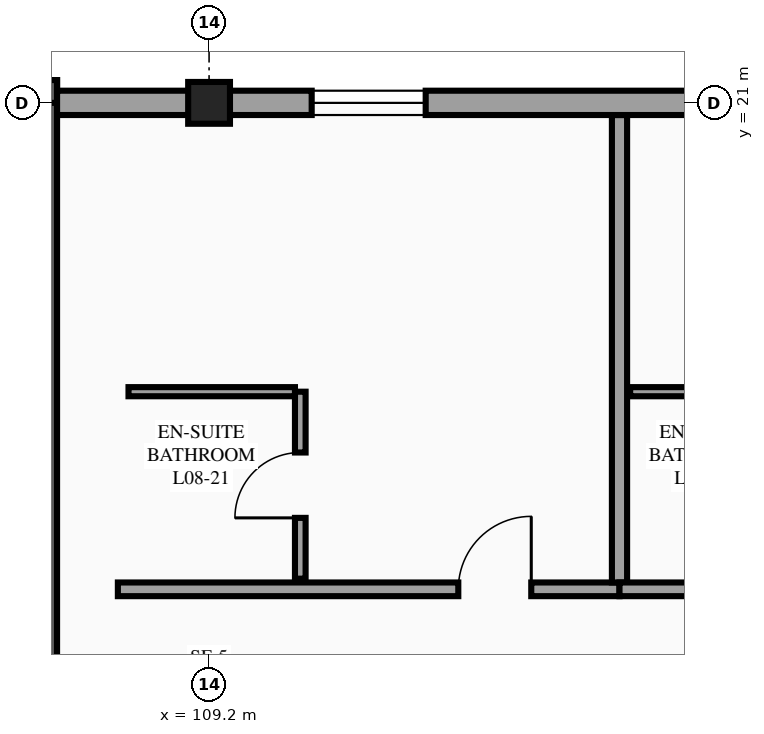
"""IFC4 building model, lengths in metres.
Left out: names, types, materials, properties, quantities, classifications, styles, units other than length and angle.
Written with IfcOpenShell. Run it as: python <this file> out.ifc"""

import sys

from ifc_helpers import new_model, si_unit, direction, frame, frame_2d, origin, origin_2d, place, context, subcontext, project, spatial, rectangle, extrude, element, fill, save


model = new_model("IFC4")
c1 = context("Model", 3, precision=1e-05, world=origin(), true_north=direction((0.0, 1.0)))
c2 = subcontext(c1, "Body", "Model", "MODEL_VIEW")
j1 = project(units=[si_unit("LENGTHUNIT", "METRE"), si_unit("PLANEANGLEUNIT", "RADIAN")], contexts=[c1])
p1 = place(None, origin())
s1 = spatial("IfcSite", under=j1, at=p1, CompositionType="ELEMENT")
p2 = place(p1, origin())
s2 = spatial("IfcBuilding", under=s1, at=p2, CompositionType="ELEMENT")
p3 = place(p2, frame((0.0, 0.0, 32.7)))
s3 = spatial("IfcBuildingStorey", under=s2, at=p3, CompositionType="ELEMENT", Elevation=32.7)
p4 = place(p3, frame((109.2, 21.0, 0.0), z_axis=(0.0, 0.0, 1.0), x_axis=(1.0, 0.0, 0.0)))
e1 = element("IfcColumn", 1, at=p4, inside=s3, PredefinedType="COLUMN", context=c2, shape_type="SweptSolid", body=[
    extrude(rectangle(XDim=0.55, YDim=0.55, at=origin_2d()), origin(), (0.0, 0.0, 1.0), 3.6),
])
p5 = place(p3, frame((107.05, 12.46, 0.0), z_axis=(0.0, 0.0, 1.0), x_axis=(0.0, 1.0, 0.0)))
e2 = element("IfcWall", 2, at=p5, inside=s3, PredefinedType="SHEAR", context=c2, shape_type="SweptSolid", body=[
    extrude(rectangle(XDim=8.84, YDim=0.3, at=frame_2d((4.42, 0.0))), origin(), (0.0, 0.0, 1.0), 3.6),
])
p6 = place(p3, frame((107.2, 21.15, 0.0), z_axis=(0.0, 0.0, 1.0), x_axis=(-1.0, 0.0, 0.0)))
e3 = element("IfcWall", 3, at=p6, inside=s3, PredefinedType="SHEAR", context=c2, shape_type="SweptSolid", body=[
    extrude(rectangle(XDim=5.2, YDim=0.3, at=frame_2d((2.6, 0.0))), origin(), (0.0, 0.0, 1.0), 3.6),
])
p7 = place(p3, frame((108.0, 14.6, 0.0), z_axis=(0.0, 0.0, 1.0), x_axis=(1.0, 0.0, 0.0)))
e4 = element("IfcWall", 4, at=p7, inside=s3, PredefinedType="PARTITIONING", context=c2, shape_type="SweptSolid", body=[
    extrude(rectangle(XDim=6.6, YDim=0.18, at=frame_2d((3.3, 0.0))), origin(), (0.0, 0.0, 1.0), 3.375),
])
p8 = place(p7, frame((4.479, 0.0, 0.0)))
e5 = element("IfcOpeningElement", 5, at=p8, cuts=e4, PredefinedType="OPENING", context=c2, shape_type="SweptSolid", body=[
    extrude(rectangle(XDim=0.96, YDim=2.15, at=frame_2d((0.48, 1.075))), frame((0.0, 0.1, 0.0), z_axis=(0.0, -1.0, 0.0), x_axis=(1.0, 0.0, 0.0)), (0.0, 0.0, 1.0), 0.2),
])
p9 = place(p3, frame((114.6, 14.69, 0.0), z_axis=(0.0, 0.0, 1.0), x_axis=(0.0, 1.0, 0.0)))
e6 = element("IfcWall", 6, at=p9, inside=s3, PredefinedType="PARTITIONING", context=c2, shape_type="SweptSolid", body=[
    extrude(rectangle(XDim=6.15, YDim=0.2, at=frame_2d((3.075, 0.0))), origin(), (0.0, 0.0, 1.0), 3.375),
])
p10 = place(p3, frame((110.4, 14.74, 0.0), z_axis=(0.0, 0.0, 1.0), x_axis=(0.0, 1.0, 0.0)))
e7 = element("IfcWall", 7, at=p10, inside=s3, PredefinedType="PARTITIONING", context=c2, shape_type="SweptSolid", body=[
    extrude(rectangle(XDim=2.46, YDim=0.14, at=frame_2d((1.23, 0.0))), origin(), (0.0, 0.0, 1.0), 3.375),
])
p11 = place(p10, frame((0.8, 0.0, 0.0)))
e8 = element("IfcOpeningElement", 8, at=p11, cuts=e7, PredefinedType="OPENING", context=c2, shape_type="SweptSolid", body=[
    extrude(rectangle(XDim=0.86, YDim=2.1, at=frame_2d((0.43, 1.05))), frame((0.0, 0.08, 0.0), z_axis=(0.0, -1.0, 0.0), x_axis=(1.0, 0.0, 0.0)), (0.0, 0.0, 1.0), 0.16),
])
p12 = place(p3, frame((108.14, 17.2, 0.0), z_axis=(0.0, 0.0, 1.0), x_axis=(1.0, 0.0, 0.0)))
e9 = element("IfcWall", 9, at=p12, inside=s3, PredefinedType="PARTITIONING", context=c2, shape_type="SweptSolid", body=[
    extrude(rectangle(XDim=2.19, YDim=0.12, at=frame_2d((1.095, 0.0))), origin(), (0.0, 0.0, 1.0), 3.375),
])
p13 = place(p3, frame((114.6, 14.6, 0.0), z_axis=(0.0, 0.0, 1.0), x_axis=(1.0, 0.0, 0.0)))
e10 = element("IfcWall", 10, at=p13, inside=s3, PredefinedType="PARTITIONING", context=c2, shape_type="SweptSolid", body=[
    extrude(rectangle(XDim=6.6, YDim=0.18, at=frame_2d((3.3, 0.0))), origin(), (0.0, 0.0, 1.0), 3.375),
])
p14 = place(p13, frame((4.479, 0.0, 0.0)))
e11 = element("IfcOpeningElement", 11, at=p14, cuts=e10, PredefinedType="OPENING", context=c2, shape_type="SweptSolid", body=[
    extrude(rectangle(XDim=0.96, YDim=2.15, at=frame_2d((0.48, 1.075))), frame((0.0, 0.1, 0.0), z_axis=(0.0, -1.0, 0.0), x_axis=(1.0, 0.0, 0.0)), (0.0, 0.0, 1.0), 0.2),
])
p15 = place(p3, frame((114.74, 17.2, 0.0), z_axis=(0.0, 0.0, 1.0), x_axis=(1.0, 0.0, 0.0)))
e12 = element("IfcWall", 12, at=p15, inside=s3, PredefinedType="PARTITIONING", context=c2, shape_type="SweptSolid", body=[
    extrude(rectangle(XDim=2.19, YDim=0.12, at=frame_2d((1.095, 0.0))), origin(), (0.0, 0.0, 1.0), 3.375),
])
p16 = place(p3, frame((117.6, 21.0, 0.0), z_axis=(0.0, 0.0, 1.0), x_axis=(-1.0, 0.0, 0.0)))
e13 = element("IfcWall", 13, at=p16, inside=s3, PredefinedType="STANDARD", context=c2, shape_type="SweptSolid", body=[
    extrude(rectangle(XDim=8.4, YDim=0.32, at=frame_2d((4.2, 0.0))), origin(), (0.0, 0.0, 1.0), 3.126),
])
p17 = place(p16, frame((5.55, 0.0, 0.85)))
e14 = element("IfcOpeningElement", 14, at=p17, cuts=e13, PredefinedType="OPENING", context=c2, shape_type="SweptSolid", body=[
    extrude(rectangle(XDim=1.5, YDim=1.5, at=frame_2d((0.75, 0.75))), frame((0.0, 0.17, 0.0), z_axis=(0.0, -1.0, 0.0), x_axis=(1.0, 0.0, 0.0)), (0.0, 0.0, 1.0), 0.34),
])
p18 = place(p3, frame((109.2, 21.0, 0.0), z_axis=(0.0, 0.0, 1.0), x_axis=(-1.0, 0.0, 0.0)))
e15 = element("IfcWall", 15, at=p18, inside=s3, PredefinedType="STANDARD", context=c2, shape_type="SweptSolid", body=[
    extrude(rectangle(XDim=2.0, YDim=0.32, at=frame_2d((1.0, 0.0))), origin(), (0.0, 0.0, 1.0), 2.58),
])
p19 = place(p17, origin())
e16 = element("IfcWindow", 16, at=p19, inside=s3, PartitioningType="SINGLE_PANEL", PredefinedType="WINDOW", context=c2, shape_type="SweptSolid", body=[
    extrude(rectangle(XDim=1.5, YDim=1.5, at=frame_2d((0.75, 0.75))), frame((0.0, 0.03, 0.0), z_axis=(0.0, -1.0, 0.0), x_axis=(1.0, 0.0, 0.0)), (0.0, 0.0, 1.0), 0.06),
])
fill(e14, e16)
p20 = place(p8, origin())
e17 = element("IfcDoor", 17, at=p20, inside=s3, OperationType="SINGLE_SWING_RIGHT", PredefinedType="DOOR", context=c2, shape_type="SweptSolid", body=[
    extrude(rectangle(XDim=0.96, YDim=2.15, at=frame_2d((0.48, 1.075))), frame((0.0, 0.025, 0.0), z_axis=(0.0, -1.0, 0.0), x_axis=(1.0, 0.0, 0.0)), (0.0, 0.0, 1.0), 0.05),
])
fill(e5, e17)
p21 = place(p11, origin())
e18 = element("IfcDoor", 18, at=p21, inside=s3, OperationType="SINGLE_SWING_LEFT", PredefinedType="DOOR", context=c2, shape_type="SweptSolid", body=[
    extrude(rectangle(XDim=0.86, YDim=2.1, at=frame_2d((0.43, 1.05))), frame((0.0, 0.025, 0.0), z_axis=(0.0, -1.0, 0.0), x_axis=(1.0, 0.0, 0.0)), (0.0, 0.0, 1.0), 0.05),
])
fill(e8, e18)
save(model, sys.argv[1])
